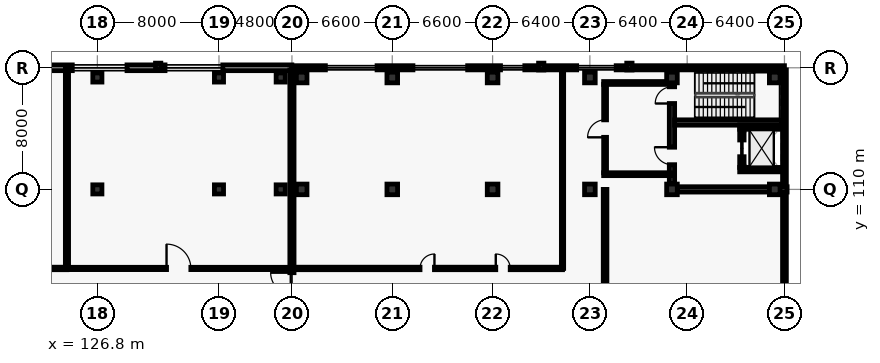
"""IFC4 building model, lengths in metres.
Left out: names, types, materials, properties, quantities, classifications, styles, units other than length and angle.
Written with IfcOpenShell. Run it as: python <this file> out.ifc"""

import sys

from ifc_helpers import new_model, si_unit, direction, frame, frame_2d, origin, origin_2d, place, context, subcontext, project, spatial, rectangle, extrude, element, fill, save


model = new_model("IFC4")
c1 = context("Model", 3, precision=1e-05, world=origin(), true_north=direction((0.0, 1.0)))
c2 = subcontext(c1, "Body", "Model", "MODEL_VIEW")
j1 = project(units=[si_unit("LENGTHUNIT", "METRE"), si_unit("PLANEANGLEUNIT", "RADIAN")], contexts=[c1])
p1 = place(None, origin())
s1 = spatial("IfcSite", under=j1, at=p1, CompositionType="ELEMENT")
p2 = place(p1, origin())
s2 = spatial("IfcBuilding", under=s1, at=p2, CompositionType="ELEMENT")
p3 = place(p2, frame((0.0, 0.0, 5.4)))
s3 = spatial("IfcBuildingStorey", under=s2, at=p3, CompositionType="ELEMENT", Elevation=5.4)
for number, where, z_axis, x_axis in (
    (1, (126.8, 110.0, 0.0), (0.0, 0.0, 1.0), (1.0, 0.0, 0.0)),
    (2, (126.8, 117.36, 0.0), (0.0, 0.0, 1.0), (1.0, 0.0, 0.0)),
    (3, (134.8, 110.0, 0.0), (0.0, 0.0, 1.0), (1.0, 0.0, 0.0)),
    (4, (134.8, 117.36, 0.0), (0.0, 0.0, 1.0), (1.0, 0.0, 0.0)),
    (5, (138.86, 110.0, 0.0), (0.0, 0.0, 1.0), (1.0, 0.0, 0.0)),
    (6, (138.86, 117.36, 0.0), (0.0, 0.0, 1.0), (1.0, 0.0, 0.0)),
):
    element("IfcColumn", number, at=place(p3, frame(where, z_axis=z_axis, x_axis=x_axis)), inside=s3, PredefinedType="COLUMN", context=c2, shape_type="SweptSolid", body=[
        extrude(rectangle(XDim=0.6, YDim=0.6, at=origin_2d()), origin(), (0.0, 0.0, 1.0), 4.8),
    ])
for number, where, z_axis, x_axis in (
    (7, (140.24, 110.0, 0.0), (0.0, 0.0, 1.0), (1.0, 0.0, 0.0)),
    (8, (140.24, 117.36, 0.0), (0.0, 0.0, 1.0), (1.0, 0.0, 0.0)),
    (9, (146.2, 110.0, 0.0), (0.0, 0.0, 1.0), (1.0, 0.0, 0.0)),
    (10, (146.2, 117.36, 0.0), (0.0, 0.0, 1.0), (1.0, 0.0, 0.0)),
    (11, (152.8, 110.0, 0.0), (0.0, 0.0, 1.0), (1.0, 0.0, 0.0)),
    (12, (152.8, 117.36, 0.0), (0.0, 0.0, 1.0), (1.0, 0.0, 0.0)),
    (13, (159.2, 110.0, 0.0), (0.0, 0.0, 1.0), (1.0, 0.0, 0.0)),
    (14, (159.2, 117.36, 0.0), (0.0, 0.0, 1.0), (1.0, 0.0, 0.0)),
    (15, (164.6, 110.0, 0.0), (0.0, 0.0, 1.0), (1.0, 0.0, 0.0)),
    (16, (164.6, 117.36, 0.0), (0.0, 0.0, 1.0), (1.0, 0.0, 0.0)),
    (17, (171.36, 110.0, 0.0), (0.0, 0.0, 1.0), (1.0, 0.0, 0.0)),
    (18, (171.36, 117.36, 0.0), (0.0, 0.0, 1.0), (1.0, 0.0, 0.0)),
):
    element("IfcColumn", number, at=place(p3, frame(where, z_axis=z_axis, x_axis=x_axis)), inside=s3, PredefinedType="COLUMN", context=c2, shape_type="SweptSolid", body=[
        extrude(rectangle(XDim=0.7, YDim=0.7, at=origin_2d()), origin(), (0.0, 0.0, 1.0), 4.8),
    ])
for number, where, z_axis, x_axis in (
    (19, (130.8, 118.08, 0.0), (0.0, 0.0, 1.0), (0.0, 1.0, 0.0)),
    (20, (156.0, 118.08, 0.0), (0.0, 0.0, 1.0), (0.0, 1.0, 0.0)),
    (21, (161.8, 118.08, 0.0), (0.0, 0.0, 1.0), (0.0, 1.0, 0.0)),
):
    element("IfcColumn", number, at=place(p3, frame(where, z_axis=z_axis, x_axis=x_axis)), inside=s3, PredefinedType="PILASTER", context=c2, shape_type="SweptSolid", body=[
        extrude(rectangle(XDim=0.35, YDim=0.45, at=origin_2d()), origin(), (0.0, 0.0, 1.0), 4.8),
    ])
p4 = place(p3, frame((94.8, 118.0, 0.0), z_axis=(0.0, 0.0, 1.0), x_axis=(1.0, 0.0, 0.0)))
e22 = element("IfcWall", 22, at=p4, inside=s3, PredefinedType="SOLIDWALL", context=c2, shape_type="SweptSolid", body=[
    extrude(rectangle(XDim=44.795, YDim=0.38, at=frame_2d((22.397, 0.0))), origin(), (0.0, 0.0, 1.0), 4.54),
])
p5 = place(p4, frame((0.75, 0.0, 0.9)))
e23 = element("IfcOpeningElement", 23, at=p5, cuts=e22, PredefinedType="OPENING", context=c2, shape_type="SweptSolid", body=[
    extrude(rectangle(XDim=2.8, YDim=1.8, at=frame_2d((1.4, 0.9))), frame((0.0, 0.2, 0.0), z_axis=(0.0, -1.0, 0.0), x_axis=(1.0, 0.0, 0.0)), (0.0, 0.0, 1.0), 0.4),
])
p6 = place(p4, frame((8.3, 0.0, 0.9)))
e24 = element("IfcOpeningElement", 24, at=p6, cuts=e22, PredefinedType="OPENING", context=c2, shape_type="SweptSolid", body=[
    extrude(rectangle(XDim=3.0, YDim=1.8, at=frame_2d((1.5, 0.9))), frame((0.0, 0.2, 0.0), z_axis=(0.0, -1.0, 0.0), x_axis=(1.0, 0.0, 0.0)), (0.0, 0.0, 1.0), 0.4),
])
p7 = place(p4, frame((15.9, 0.0, 0.9)))
e25 = element("IfcOpeningElement", 25, at=p7, cuts=e22, PredefinedType="OPENING", context=c2, shape_type="SweptSolid", body=[
    extrude(rectangle(XDim=3.2, YDim=1.85, at=frame_2d((1.6, 0.925))), frame((0.0, 0.2, 0.0), z_axis=(0.0, -1.0, 0.0), x_axis=(1.0, 0.0, 0.0)), (0.0, 0.0, 1.0), 0.4),
])
p8 = place(p4, frame((22.75, 0.0, 0.9)))
e26 = element("IfcOpeningElement", 26, at=p8, cuts=e22, PredefinedType="OPENING", context=c2, shape_type="SweptSolid", body=[
    extrude(rectangle(XDim=3.4, YDim=1.85, at=frame_2d((1.7, 0.925))), frame((0.0, 0.2, 0.0), z_axis=(0.0, -1.0, 0.0), x_axis=(1.0, 0.0, 0.0)), (0.0, 0.0, 1.0), 0.4),
])
p9 = place(p4, frame((30.35, 0.0, 0.9)))
e27 = element("IfcOpeningElement", 27, at=p9, cuts=e22, PredefinedType="OPENING", context=c2, shape_type="SweptSolid", body=[
    extrude(rectangle(XDim=3.6, YDim=1.9, at=frame_2d((1.8, 0.95))), frame((0.0, 0.2, 0.0), z_axis=(0.0, -1.0, 0.0), x_axis=(1.0, 0.0, 0.0)), (0.0, 0.0, 1.0), 0.4),
])
p10 = place(p4, frame((36.45, 0.0, 0.9)))
e28 = element("IfcOpeningElement", 28, at=p10, cuts=e22, PredefinedType="OPENING", context=c2, shape_type="SweptSolid", body=[
    extrude(rectangle(XDim=3.8, YDim=1.9, at=frame_2d((1.9, 0.95))), frame((0.0, 0.2, 0.0), z_axis=(0.0, -1.0, 0.0), x_axis=(1.0, 0.0, 0.0)), (0.0, 0.0, 1.0), 0.4),
])
p11 = place(p3, frame((139.6, 118.0, 0.0), z_axis=(0.0, 0.0, 1.0), x_axis=(1.0, 0.0, 0.0)))
e29 = element("IfcWall", 29, at=p11, inside=s3, PredefinedType="SOLIDWALL", context=c2, shape_type="SweptSolid", body=[
    extrude(rectangle(XDim=32.4, YDim=0.275, at=frame_2d((16.2, 0.0))), origin(), (0.0, 0.0, 1.0), 4.55),
])
p12 = place(p11, frame((2.2, 0.0, 0.9)))
e30 = element("IfcOpeningElement", 30, at=p12, cuts=e29, PredefinedType="OPENING", context=c2, shape_type="SweptSolid", body=[
    extrude(rectangle(XDim=3.4, YDim=1.85, at=frame_2d((1.7, 0.925))), frame((0.0, 0.147, 0.0), z_axis=(0.0, -1.0, 0.0), x_axis=(1.0, 0.0, 0.0)), (0.0, 0.0, 1.0), 0.295),
])
p13 = place(p11, frame((7.96, 0.0, 0.9)))
e31 = element("IfcOpeningElement", 31, at=p13, cuts=e29, PredefinedType="OPENING", context=c2, shape_type="SweptSolid", body=[
    extrude(rectangle(XDim=3.6, YDim=1.9, at=frame_2d((1.8, 0.95))), frame((0.0, 0.147, 0.0), z_axis=(0.0, -1.0, 0.0), x_axis=(1.0, 0.0, 0.0)), (0.0, 0.0, 1.0), 0.295),
])
p14 = place(p11, frame((13.72, 0.0, 0.9)))
e32 = element("IfcOpeningElement", 32, at=p14, cuts=e29, PredefinedType="OPENING", context=c2, shape_type="SweptSolid", body=[
    extrude(rectangle(XDim=1.6, YDim=1.65, at=frame_2d((0.8, 0.825))), frame((0.0, 0.147, 0.0), z_axis=(0.0, -1.0, 0.0), x_axis=(1.0, 0.0, 0.0)), (0.0, 0.0, 1.0), 0.295),
])
p15 = place(p11, frame((18.73, 0.0, 0.9)))
e33 = element("IfcOpeningElement", 33, at=p15, cuts=e29, PredefinedType="OPENING", context=c2, shape_type="SweptSolid", body=[
    extrude(rectangle(XDim=2.6, YDim=2.35, at=frame_2d((1.3, 1.175))), frame((0.0, 0.147, 0.0), z_axis=(0.0, -1.0, 0.0), x_axis=(1.0, 0.0, 0.0)), (0.0, 0.0, 1.0), 0.295),
])
p16 = place(p3, frame((172.0, 117.86, 0.0), z_axis=(0.0, 0.0, 1.0), x_axis=(0.0, -1.0, 0.0)))
e34 = element("IfcWall", 34, at=p16, inside=s3, PredefinedType="SOLIDWALL", context=c2, shape_type="SweptSolid", body=[
    extrude(rectangle(XDim=46.12, YDim=0.25, at=frame_2d((23.06, 0.0))), origin(), (0.0, 0.0, 1.0), 4.55),
])
p17 = place(p3, frame((139.6, 71.74, 0.0), z_axis=(0.0, 0.0, 1.0), x_axis=(0.0, 1.0, 0.0)))
e35 = element("IfcWall", 35, at=p17, inside=s3, PredefinedType="SOLIDWALL", context=c2, shape_type="SweptSolid", body=[
    extrude(rectangle(XDim=46.12, YDim=0.275, at=frame_2d((23.06, 0.0))), origin(), (0.0, 0.0, 1.0), 3.69),
])
p18 = place(p17, frame((31.38, 0.0, 0.0)))
e36 = element("IfcOpeningElement", 36, at=p18, cuts=e35, PredefinedType="OPENING", context=c2, shape_type="SweptSolid", body=[
    extrude(rectangle(XDim=1.4, YDim=2.25, at=frame_2d((0.7, 1.125))), frame((0.0, 0.147, 0.0), z_axis=(0.0, -1.0, 0.0), x_axis=(1.0, 0.0, 0.0)), (0.0, 0.0, 1.0), 0.295),
])
p19 = place(p3, frame((164.952, 110.0, 0.0), z_axis=(0.0, 0.0, 1.0), x_axis=(1.0, 0.0, 0.0)))
e37 = element("IfcWall", 37, at=p19, inside=s3, PredefinedType="SHEAR", context=c2, shape_type="SweptSolid", body=[
    extrude(rectangle(XDim=7.223, YDim=0.35, at=frame_2d((3.612, 0.0))), origin(), (0.0, 0.0, 1.0), 4.55),
])
p20 = place(p3, frame((164.6, 110.352, 0.0), z_axis=(0.0, 0.0, 1.0), x_axis=(0.0, 1.0, 0.0)))
e38 = element("IfcWall", 38, at=p20, inside=s3, PredefinedType="SHEAR", context=c2, shape_type="SweptSolid", body=[
    extrude(rectangle(XDim=7.473, YDim=0.35, at=frame_2d((3.736, 0.0))), origin(), (0.0, 0.0, 1.0), 4.55),
])
p21 = place(p20, frame((5.298, 0.0, 0.0)))
e39 = element("IfcOpeningElement", 39, at=p21, cuts=e38, PredefinedType="OPENING", context=c2, shape_type="SweptSolid", body=[
    extrude(rectangle(XDim=1.1, YDim=2.15, at=frame_2d((0.55, 1.075))), frame((0.0, 0.185, 0.0), z_axis=(0.0, -1.0, 0.0), x_axis=(1.0, 0.0, 0.0)), (0.0, 0.0, 1.0), 0.37),
])
p22 = place(p20, frame((1.273, 0.0, 0.0)))
e40 = element("IfcOpeningElement", 40, at=p22, cuts=e38, PredefinedType="OPENING", context=c2, shape_type="SweptSolid", body=[
    extrude(rectangle(XDim=1.15, YDim=2.2, at=frame_2d((0.575, 1.1))), frame((0.0, 0.185, 0.0), z_axis=(0.0, -1.0, 0.0), x_axis=(1.0, 0.0, 0.0)), (0.0, 0.0, 1.0), 0.37),
])
p23 = place(p3, frame((164.775, 114.4, 0.0), z_axis=(0.0, 0.0, 1.0), x_axis=(1.0, 0.0, 0.0)))
e41 = element("IfcWall", 41, at=p23, inside=s3, PredefinedType="SHEAR", context=c2, shape_type="SweptSolid", body=[
    extrude(rectangle(XDim=7.05, YDim=0.35, at=frame_2d((3.525, 0.0))), origin(), (0.0, 0.0, 1.0), 4.55),
])
for number, where, z_axis, x_axis in (
    (42, (169.055, 111.3, 0.0), (0.0, 0.0, 1.0), (1.0, 0.0, 0.0)),
    (43, (169.055, 114.1, 0.0), (0.0, 0.0, 1.0), (1.0, 0.0, 0.0)),
):
    element("IfcWall", number, at=place(p3, frame(where, z_axis=z_axis, x_axis=x_axis)), inside=s3, PredefinedType="SHEAR", context=c2, shape_type="SweptSolid", body=[
        extrude(rectangle(XDim=2.89, YDim=0.29, at=frame_2d((1.445, 0.0))), origin(), (0.0, 0.0, 1.0), 4.55),
    ])
p24 = place(p3, frame((169.2, 111.445, 0.0), z_axis=(0.0, 0.0, 1.0), x_axis=(0.0, 1.0, 0.0)))
e44 = element("IfcWall", 44, at=p24, inside=s3, PredefinedType="SHEAR", context=c2, shape_type="SweptSolid", body=[
    extrude(rectangle(XDim=2.51, YDim=0.29, at=frame_2d((1.255, 0.0))), origin(), (0.0, 0.0, 1.0), 4.55),
])
p25 = place(p24, frame((0.705, 0.0, 0.0)))
e45 = element("IfcOpeningElement", 45, at=p25, cuts=e44, PredefinedType="OPENING", context=c2, shape_type="SweptSolid", body=[
    extrude(rectangle(XDim=1.1, YDim=2.15, at=frame_2d((0.55, 1.075))), frame((0.0, 0.155, 0.0), z_axis=(0.0, -1.0, 0.0), x_axis=(1.0, 0.0, 0.0)), (0.0, 0.0, 1.0), 0.31),
])
p26 = place(p3, frame((160.105, 111.0, 0.0), z_axis=(0.0, 0.0, 1.0), x_axis=(1.0, 0.0, 0.0)))
e46 = element("IfcWall", 46, at=p26, inside=s3, PredefinedType="PARTITIONING", context=c2, shape_type="SweptSolid", body=[
    extrude(rectangle(XDim=4.495, YDim=0.19, at=frame_2d((2.248, 0.0))), origin(), (0.0, 0.0, 1.0), 4.55),
])
p27 = place(p3, frame((160.105, 117.0, 0.0), z_axis=(0.0, 0.0, 1.0), x_axis=(1.0, 0.0, 0.0)))
e47 = element("IfcWall", 47, at=p27, inside=s3, PredefinedType="PARTITIONING", context=c2, shape_type="SweptSolid", body=[
    extrude(rectangle(XDim=4.143, YDim=0.19, at=frame_2d((2.072, 0.0))), origin(), (0.0, 0.0, 1.0), 3.9),
])
p28 = place(p3, frame((160.2, 111.095, 0.0), z_axis=(0.0, 0.0, 1.0), x_axis=(0.0, 1.0, 0.0)))
e48 = element("IfcWall", 48, at=p28, inside=s3, PredefinedType="PARTITIONING", context=c2, shape_type="SweptSolid", body=[
    extrude(rectangle(XDim=5.81, YDim=0.19, at=frame_2d((2.905, 0.0))), origin(), (0.0, 0.0, 1.0), 4.55),
])
p29 = place(p28, frame((2.33, 0.0, 0.0)))
e49 = element("IfcOpeningElement", 49, at=p29, cuts=e48, PredefinedType="OPENING", context=c2, shape_type="SweptSolid", body=[
    extrude(rectangle(XDim=1.15, YDim=2.2, at=frame_2d((0.575, 1.1))), frame((0.0, 0.105, 0.0), z_axis=(0.0, -1.0, 0.0), x_axis=(1.0, 0.0, 0.0)), (0.0, 0.0, 1.0), 0.21),
])
p30 = place(p3, frame((109.8, 104.8, 0.0), z_axis=(0.0, 0.0, 1.0), x_axis=(1.0, 0.0, 0.0)))
e50 = element("IfcWall", 50, at=p30, inside=s3, PredefinedType="PARTITIONING", context=c2, shape_type="SweptSolid", body=[
    extrude(rectangle(XDim=15.0, YDim=0.165, at=frame_2d((7.5, 0.0))), origin(), (0.0, 0.0, 1.0), 4.54),
])
p31 = place(p30, frame((7.03, 0.0, 0.0)))
e51 = element("IfcOpeningElement", 51, at=p31, cuts=e50, PredefinedType="OPENING", context=c2, shape_type="SweptSolid", body=[
    extrude(rectangle(XDim=0.94, YDim=2.15, at=frame_2d((0.47, 1.075))), frame((0.0, 0.093, 0.0), z_axis=(0.0, -1.0, 0.0), x_axis=(1.0, 0.0, 0.0)), (0.0, 0.0, 1.0), 0.185),
])
p32 = place(p3, frame((124.8, 104.8, 0.0), z_axis=(0.0, 0.0, 1.0), x_axis=(1.0, 0.0, 0.0)))
e52 = element("IfcWall", 52, at=p32, inside=s3, PredefinedType="PARTITIONING", context=c2, shape_type="SweptSolid", body=[
    extrude(rectangle(XDim=14.7, YDim=0.15, at=frame_2d((7.35, 0.0))), origin(), (0.0, 0.0, 1.0), 4.54),
])
p33 = place(p32, frame((6.55, 0.0, 0.0)))
e53 = element("IfcOpeningElement", 53, at=p33, cuts=e52, PredefinedType="OPENING", context=c2, shape_type="SweptSolid", body=[
    extrude(rectangle(XDim=1.6, YDim=2.3, at=frame_2d((0.8, 1.15))), frame((0.0, 0.085, 0.0), z_axis=(0.0, -1.0, 0.0), x_axis=(1.0, 0.0, 0.0)), (0.0, 0.0, 1.0), 0.17),
])
p34 = place(p3, frame((124.8, 118.0, 0.0), z_axis=(0.0, 0.0, 1.0), x_axis=(0.0, -1.0, 0.0)))
e54 = element("IfcWall", 54, at=p34, inside=s3, PredefinedType="PARTITIONING", context=c2, shape_type="SweptSolid", body=[
    extrude(rectangle(XDim=13.2, YDim=0.21, at=frame_2d((6.6, 0.0))), origin(), (0.0, 0.0, 1.0), 4.54),
])
p35 = place(p3, frame((139.6, 104.8, 0.0), z_axis=(0.0, 0.0, 1.0), x_axis=(1.0, 0.0, 0.0)))
e55 = element("IfcWall", 55, at=p35, inside=s3, PredefinedType="PARTITIONING", context=c2, shape_type="SweptSolid", body=[
    extrude(rectangle(XDim=17.8, YDim=0.165, at=frame_2d((8.9, 0.0))), origin(), (0.0, 0.0, 1.0), 4.55),
])
p36 = place(p35, frame((8.425, 0.0, 0.0)))
e56 = element("IfcOpeningElement", 56, at=p36, cuts=e55, PredefinedType="OPENING", context=c2, shape_type="SweptSolid", body=[
    extrude(rectangle(XDim=0.95, YDim=2.1, at=frame_2d((0.475, 1.05))), frame((0.0, 0.093, 0.0), z_axis=(0.0, -1.0, 0.0), x_axis=(1.0, 0.0, 0.0)), (0.0, 0.0, 1.0), 0.185),
])
p37 = place(p35, frame((13.409, 0.0, 0.0)))
e57 = element("IfcOpeningElement", 57, at=p37, cuts=e55, PredefinedType="OPENING", context=c2, shape_type="SweptSolid", body=[
    extrude(rectangle(XDim=0.95, YDim=2.1, at=frame_2d((0.475, 1.05))), frame((0.0, 0.093, 0.0), z_axis=(0.0, -1.0, 0.0), x_axis=(1.0, 0.0, 0.0)), (0.0, 0.0, 1.0), 0.185),
])
p38 = place(p3, frame((157.4, 104.8, 0.0), z_axis=(0.0, 0.0, 1.0), x_axis=(0.0, 1.0, 0.0)))
e58 = element("IfcWall", 58, at=p38, inside=s3, PredefinedType="PARTITIONING", context=c2, shape_type="SweptSolid", body=[
    extrude(rectangle(XDim=13.2, YDim=0.15, at=frame_2d((6.6, 0.0))), origin(), (0.0, 0.0, 1.0), 4.55),
])
p39 = place(p3, frame((160.2, 110.0, 0.0), z_axis=(0.0, 0.0, 1.0), x_axis=(0.0, -1.0, 0.0)))
e59 = element("IfcWall", 59, at=p39, inside=s3, PredefinedType="PARTITIONING", context=c2, shape_type="SweptSolid", body=[
    extrude(rectangle(XDim=8.0, YDim=0.24, at=frame_2d((4.0, 0.0))), origin(), (0.0, 0.0, 1.0), 4.55),
])
p40 = place(p9, origin())
e60 = element("IfcWindow", 60, at=p40, inside=s3, PartitioningType="SINGLE_PANEL", PredefinedType="WINDOW", context=c2, shape_type="SweptSolid", body=[
    extrude(rectangle(XDim=3.6, YDim=1.9, at=frame_2d((1.8, 0.95))), frame((0.0, 0.03, 0.0), z_axis=(0.0, -1.0, 0.0), x_axis=(1.0, 0.0, 0.0)), (0.0, 0.0, 1.0), 0.06),
])
fill(e27, e60)
p41 = place(p10, origin())
e61 = element("IfcWindow", 61, at=p41, inside=s3, PartitioningType="SINGLE_PANEL", PredefinedType="WINDOW", context=c2, shape_type="SweptSolid", body=[
    extrude(rectangle(XDim=3.8, YDim=1.9, at=frame_2d((1.9, 0.95))), frame((0.0, 0.03, 0.0), z_axis=(0.0, -1.0, 0.0), x_axis=(1.0, 0.0, 0.0)), (0.0, 0.0, 1.0), 0.06),
])
fill(e28, e61)
p42 = place(p12, origin())
e62 = element("IfcWindow", 62, at=p42, inside=s3, PartitioningType="SINGLE_PANEL", PredefinedType="WINDOW", context=c2, shape_type="SweptSolid", body=[
    extrude(rectangle(XDim=3.4, YDim=1.85, at=frame_2d((1.7, 0.925))), frame((0.0, 0.03, 0.0), z_axis=(0.0, -1.0, 0.0), x_axis=(1.0, 0.0, 0.0)), (0.0, 0.0, 1.0), 0.06),
])
fill(e30, e62)
p43 = place(p13, origin())
e63 = element("IfcWindow", 63, at=p43, inside=s3, PartitioningType="SINGLE_PANEL", PredefinedType="WINDOW", context=c2, shape_type="SweptSolid", body=[
    extrude(rectangle(XDim=3.6, YDim=1.9, at=frame_2d((1.8, 0.95))), frame((0.0, 0.03, 0.0), z_axis=(0.0, -1.0, 0.0), x_axis=(1.0, 0.0, 0.0)), (0.0, 0.0, 1.0), 0.06),
])
fill(e31, e63)
p44 = place(p14, origin())
e64 = element("IfcWindow", 64, at=p44, inside=s3, PartitioningType="SINGLE_PANEL", PredefinedType="WINDOW", context=c2, shape_type="SweptSolid", body=[
    extrude(rectangle(XDim=1.6, YDim=1.65, at=frame_2d((0.8, 0.825))), frame((0.0, 0.03, 0.0), z_axis=(0.0, -1.0, 0.0), x_axis=(1.0, 0.0, 0.0)), (0.0, 0.0, 1.0), 0.06),
])
fill(e32, e64)
p45 = place(p15, origin())
e65 = element("IfcWindow", 65, at=p45, inside=s3, PartitioningType="SINGLE_PANEL", PredefinedType="WINDOW", context=c2, shape_type="SweptSolid", body=[
    extrude(rectangle(XDim=2.6, YDim=2.35, at=frame_2d((1.3, 1.175))), frame((0.0, 0.03, 0.0), z_axis=(0.0, -1.0, 0.0), x_axis=(1.0, 0.0, 0.0)), (0.0, 0.0, 1.0), 0.06),
])
fill(e33, e65)
p46 = place(p21, origin())
e66 = element("IfcDoor", 66, at=p46, inside=s3, OperationType="SINGLE_SWING_LEFT", PredefinedType="DOOR", context=c2, shape_type="SweptSolid", body=[
    extrude(rectangle(XDim=1.1, YDim=2.15, at=frame_2d((0.55, 1.075))), frame((0.0, 0.025, 0.0), z_axis=(0.0, -1.0, 0.0), x_axis=(1.0, 0.0, 0.0)), (0.0, 0.0, 1.0), 0.05),
])
fill(e39, e66)
p47 = place(p22, origin())
e67 = element("IfcDoor", 67, at=p47, inside=s3, OperationType="SINGLE_SWING_RIGHT", PredefinedType="DOOR", context=c2, shape_type="SweptSolid", body=[
    extrude(rectangle(XDim=1.15, YDim=2.2, at=frame_2d((0.575, 1.1))), frame((0.0, 0.025, 0.0), z_axis=(0.0, -1.0, 0.0), x_axis=(1.0, 0.0, 0.0)), (0.0, 0.0, 1.0), 0.05),
])
fill(e40, e67)
p48 = place(p25, origin())
e68 = element("IfcDoor", 68, at=p48, inside=s3, OperationType="SLIDING_TO_LEFT", PredefinedType="DOOR", context=c2, shape_type="SweptSolid", body=[
    extrude(rectangle(XDim=1.1, YDim=2.15, at=frame_2d((0.55, 1.075))), frame((0.0, 0.025, 0.0), z_axis=(0.0, -1.0, 0.0), x_axis=(1.0, 0.0, 0.0)), (0.0, 0.0, 1.0), 0.05),
])
fill(e45, e68)
p49 = place(p29, origin())
e69 = element("IfcDoor", 69, at=p49, inside=s3, OperationType="SINGLE_SWING_LEFT", PredefinedType="DOOR", context=c2, shape_type="SweptSolid", body=[
    extrude(rectangle(XDim=1.15, YDim=2.2, at=frame_2d((0.575, 1.1))), frame((0.0, 0.025, 0.0), z_axis=(0.0, -1.0, 0.0), x_axis=(1.0, 0.0, 0.0)), (0.0, 0.0, 1.0), 0.05),
])
fill(e49, e69)
p50 = place(p18, origin())
e70 = element("IfcDoor", 70, at=p50, inside=s3, OperationType="SINGLE_SWING_RIGHT", PredefinedType="DOOR", context=c2, shape_type="SweptSolid", body=[
    extrude(rectangle(XDim=1.4, YDim=2.25, at=frame_2d((0.7, 1.125))), frame((0.0, 0.025, 0.0), z_axis=(0.0, -1.0, 0.0), x_axis=(1.0, 0.0, 0.0)), (0.0, 0.0, 1.0), 0.05),
])
fill(e36, e70)
p51 = place(p33, origin())
e71 = element("IfcDoor", 71, at=p51, inside=s3, OperationType="SINGLE_SWING_LEFT", PredefinedType="DOOR", context=c2, shape_type="SweptSolid", body=[
    extrude(rectangle(XDim=1.6, YDim=2.3, at=frame_2d((0.8, 1.15))), frame((0.0, 0.025, 0.0), z_axis=(0.0, -1.0, 0.0), x_axis=(1.0, 0.0, 0.0)), (0.0, 0.0, 1.0), 0.05),
])
fill(e53, e71)
p52 = place(p36, origin())
e72 = element("IfcDoor", 72, at=p52, inside=s3, OperationType="SINGLE_SWING_RIGHT", PredefinedType="DOOR", context=c2, shape_type="SweptSolid", body=[
    extrude(rectangle(XDim=0.95, YDim=2.1, at=frame_2d((0.475, 1.05))), frame((0.0, 0.025, 0.0), z_axis=(0.0, -1.0, 0.0), x_axis=(1.0, 0.0, 0.0)), (0.0, 0.0, 1.0), 0.05),
])
fill(e56, e72)
p53 = place(p37, origin())
e73 = element("IfcDoor", 73, at=p53, inside=s3, OperationType="SINGLE_SWING_LEFT", PredefinedType="DOOR", context=c2, shape_type="SweptSolid", body=[
    extrude(rectangle(XDim=0.95, YDim=2.1, at=frame_2d((0.475, 1.05))), frame((0.0, 0.025, 0.0), z_axis=(0.0, -1.0, 0.0), x_axis=(1.0, 0.0, 0.0)), (0.0, 0.0, 1.0), 0.05),
])
fill(e57, e73)
save(model, sys.argv[1])
